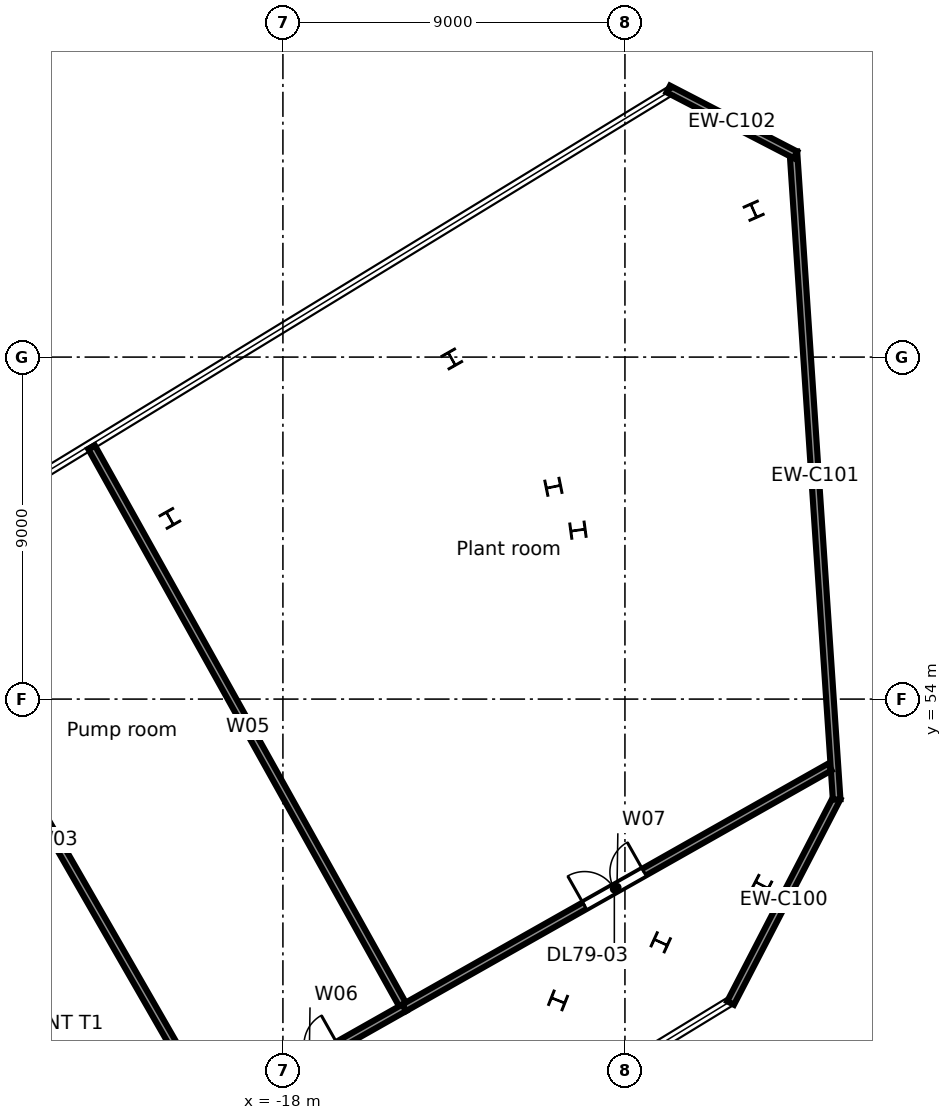
"""IFC4 building model, lengths in metres.
Left out: names, types, materials, properties, quantities, classifications, styles, units other than length and angle.
Written with IfcOpenShell. Run it as: python <this file> out.ifc"""

import sys

from ifc_helpers import new_model, si_unit, direction, frame, frame_2d, origin, origin_2d, place, context, subcontext, project, spatial, rectangle, i_section, extrude, element, fill, save


model = new_model("IFC4")
c1 = context("Model", 3, precision=1e-05, world=origin(), true_north=direction((0.0, 1.0)))
c2 = subcontext(c1, "Body", "Model", "MODEL_VIEW")
j1 = project(units=[si_unit("LENGTHUNIT", "METRE"), si_unit("PLANEANGLEUNIT", "RADIAN")], contexts=[c1])
p1 = place(None, origin())
s1 = spatial("IfcSite", under=j1, at=p1, CompositionType="ELEMENT")
p2 = place(p1, origin())
s2 = spatial("IfcBuilding", under=s1, at=p2, CompositionType="ELEMENT")
p3 = place(p2, frame((0.0, 0.0, 350.5)))
s3 = spatial("IfcBuildingStorey", under=s2, at=p3, CompositionType="ELEMENT", Elevation=350.5)
for number, where, z_axis, x_axis in (
    (1, (-5.398, 49.104, 0.0), (0.0, 0.0, 1.0), (0.46, 0.888, 0.0)),
    (2, (-5.613, 66.852, 0.0), (0.0, 0.0, 1.0), (-0.915, -0.404, 0.0)),
    (3, (-13.556, 62.952, 0.0), (0.0, 0.0, 1.0), (-0.87, -0.492, 0.0)),
    (4, (-20.974, 58.755, 0.0), (0.0, 0.0, 1.0), (-0.87, -0.492, 0.0)),
):
    element("IfcColumn", number, at=place(p3, frame(where, z_axis=z_axis, x_axis=x_axis)), inside=s3, PredefinedType="COLUMN", context=c2, shape_type="SweptSolid", body=[
        extrude(i_section(OverallWidth=0.4, OverallDepth=0.4, WebThickness=0.013, FlangeThickness=0.021, FilletRadius=0.022, at=origin_2d()), origin(), (0.0, 0.0, 1.0), 3.3),
    ])
for number, where, z_axis, x_axis in (
    (5, (-8.058, 47.599, 0.0), (0.0, 0.0, 1.0), (0.415, 0.91, 0.0)),
    (6, (-10.237, 58.445, 0.0), (0.0, 0.0, 1.0), (-0.133, 0.991, 0.0)),
    (7, (-10.76, 46.071, 0.0), (0.0, 0.0, 1.0), (0.369, 0.929, 0.0)),
    (8, (-10.882, 59.587, 0.0), (0.0, 0.0, 1.0), (-0.199, 0.98, 0.0)),
):
    element("IfcColumn", number, at=place(p3, frame(where, z_axis=z_axis, x_axis=x_axis)), inside=s3, PredefinedType="COLUMN", context=c2, shape_type="SweptSolid", body=[
        extrude(i_section(OverallWidth=0.4, OverallDepth=0.4, WebThickness=0.013, FlangeThickness=0.021, FilletRadius=0.022, at=origin_2d()), origin(), (0.0, 0.0, 1.0), 3.6),
    ])
p4 = place(p3, frame((-3.418, 51.41, 0.0), z_axis=(0.0, 0.0, 1.0), x_axis=(-0.459961474469, -0.887938872899, 0.0)))
e9 = element("IfcWall", 9, at=p4, inside=s3, PredefinedType="STANDARD", context=c2, shape_type="SweptSolid", body=[
    extrude(rectangle(XDim=6.091, YDim=0.2, at=frame_2d((3.046, 0.0))), origin(), (0.0, 0.0, 1.0), 3.3),
])
p5 = place(p3, frame((-4.567, 68.404, 0.0), z_axis=(0.0, 0.0, 1.0), x_axis=(0.066621445169, -0.997778323599, 0.0)))
e10 = element("IfcWall", 10, at=p5, inside=s3, PredefinedType="STANDARD", context=c2, shape_type="SweptSolid", body=[
    extrude(rectangle(XDim=17.084, YDim=0.2, at=frame_2d((8.542, 0.0))), origin(), (0.0, 0.0, 1.0), 3.3),
])
p6 = place(p3, frame((-7.86, 70.055, 0.0), z_axis=(0.0, 0.0, 1.0), x_axis=(0.887922126938, -0.459993800495, 0.0)))
e11 = element("IfcWall", 11, at=p6, inside=s3, PredefinedType="STANDARD", context=c2, shape_type="SweptSolid", body=[
    extrude(rectangle(XDim=3.769, YDim=0.2, at=frame_2d((1.884, 0.0))), origin(), (0.0, 0.0, 1.0), 3.3),
])
p7 = place(p3, frame((-28.131, 57.521, 0.0), z_axis=(0.0, 0.0, 1.0), x_axis=(0.498362592797, -0.866968699609, 0.0)))
e12 = element("IfcWall", 12, at=p7, inside=s3, PredefinedType="PARTITIONING", context=c2, shape_type="SweptSolid", body=[
    extrude(rectangle(XDim=16.695, YDim=0.2, at=frame_2d((8.347, 0.0))), origin(), (0.0, 0.0, 1.0), 2.68),
])
p8 = place(p3, frame((-23.037, 60.631, 0.0), z_axis=(0.0, 0.0, 1.0), x_axis=(0.487224959402, -0.873276496269, 0.0)))
e13 = element("IfcWall", 13, at=p8, inside=s3, PredefinedType="PARTITIONING", context=c2, shape_type="SweptSolid", body=[
    extrude(rectangle(XDim=16.894, YDim=0.2, at=frame_2d((8.447, 0.0))), origin(), (0.0, 0.0, 1.0), 2.68),
])
p9 = place(p3, frame((-19.811, 43.047, 0.0), z_axis=(0.0, 0.0, 1.0), x_axis=(0.870426794604, 0.492297872467, 0.0)))
e14 = element("IfcWall", 14, at=p9, inside=s3, PredefinedType="PARTITIONING", context=c2, shape_type="SweptSolid", body=[
    extrude(rectangle(XDim=5.75, YDim=0.2, at=frame_2d((2.875, 0.0))), origin(), (0.0, 0.0, 1.0), 3.3),
])
p10 = place(p9, frame((1.95, 0.0, 0.0)))
e15 = element("IfcOpeningElement", 15, at=p10, cuts=e14, PredefinedType="OPENING", context=c2, shape_type="SweptSolid", body=[
    extrude(rectangle(XDim=1.8, YDim=2.1, at=frame_2d((0.9, 1.05))), frame((0.0, 0.11, 0.0), z_axis=(0.0, -1.0, 0.0), x_axis=(1.0, 0.0, 0.0)), (0.0, 0.0, 1.0), 0.22),
])
p11 = place(p3, frame((-14.806, 45.878, 0.0), z_axis=(0.0, 0.0, 1.0), x_axis=(0.870379652776, 0.492381214136, 0.0)))
e16 = element("IfcWall", 16, at=p11, inside=s3, PredefinedType="PARTITIONING", context=c2, shape_type="SweptSolid", body=[
    extrude(rectangle(XDim=12.862, YDim=0.2, at=frame_2d((6.431, 0.0))), origin(), (0.0, 0.0, 1.0), 2.68),
])
p12 = place(p11, frame((5.45, 0.0, 0.0)))
e17 = element("IfcOpeningElement", 17, at=p12, cuts=e16, PredefinedType="OPENING", context=c2, shape_type="SweptSolid", body=[
    extrude(rectangle(XDim=1.8, YDim=2.1, at=frame_2d((0.9, 1.05))), frame((0.0, 0.11, 0.0), z_axis=(0.0, -1.0, 0.0), x_axis=(1.0, 0.0, 0.0)), (0.0, 0.0, 1.0), 0.22),
])
p13 = place(p12, origin())
e18 = element("IfcDoor", 18, at=p13, inside=s3, OperationType="DOUBLE_DOOR_SINGLE_SWING", PredefinedType="DOOR", context=c2, shape_type="SweptSolid", body=[
    extrude(rectangle(XDim=1.8, YDim=2.1, at=frame_2d((0.9, 1.05))), frame((0.0, 0.025, 0.0), z_axis=(0.0, -1.0, 0.0), x_axis=(1.0, 0.0, 0.0)), (0.0, 0.0, 1.0), 0.05),
])
fill(e17, e18)
save(model, sys.argv[1])
